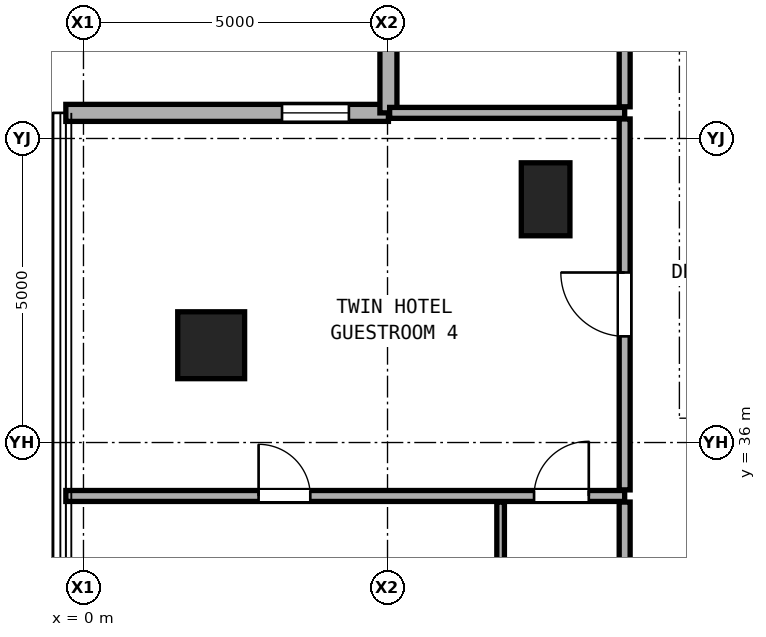
"""IFC4 building model, lengths in metres.
Left out: names, types, materials, properties, quantities, classifications, styles, units other than length and angle.
Written with IfcOpenShell. Run it as: python <this file> out.ifc"""

import sys

from ifc_helpers import new_model, si_unit, direction, frame, frame_2d, origin, origin_2d, place, context, subcontext, project, spatial, rectangle, hollow_rectangle, extrude, element, fill, save


model = new_model("IFC4")
c1 = context("Model", 3, precision=1e-05, world=origin(), true_north=direction((0.0, 1.0)))
c2 = subcontext(c1, "Body", "Model", "MODEL_VIEW")
j1 = project(units=[si_unit("LENGTHUNIT", "METRE"), si_unit("PLANEANGLEUNIT", "RADIAN")], contexts=[c1])
p1 = place(None, origin())
s1 = spatial("IfcSite", under=j1, at=p1, CompositionType="ELEMENT")
p2 = place(p1, origin())
s2 = spatial("IfcBuilding", under=s1, at=p2, CompositionType="ELEMENT")
p3 = place(p2, frame((0.0, 0.0, 95.0)))
s3 = spatial("IfcBuildingStorey", under=s2, at=p3, CompositionType="ELEMENT", Elevation=95.0)
p4 = place(p3, frame((2.1, 37.6, 0.0), z_axis=(0.0, 0.0, 1.0), x_axis=(1.0, 0.0, 0.0)))
e1 = element("IfcColumn", 1, at=p4, inside=s3, PredefinedType="COLUMN", context=c2, shape_type="SweptSolid", body=[
    extrude(hollow_rectangle(XDim=1.1, YDim=1.1, WallThickness=0.06, at=origin_2d()), origin(), (0.0, 0.0, 1.0), 3.3),
])
p5 = place(p3, frame((7.6, 40.0, 0.0), z_axis=(0.0, 0.0, 1.0), x_axis=(1.0, 0.0, 0.0)))
e2 = element("IfcColumn", 2, at=p5, inside=s3, PredefinedType="PILASTER", context=c2, shape_type="SweptSolid", body=[
    extrude(rectangle(XDim=0.8, YDim=1.2, at=origin_2d()), origin(), (0.0, 0.0, 1.0), 3.3),
])
p6 = place(p3, frame((5.015, 41.421, 0.0), z_axis=(0.0, 0.0, 1.0), x_axis=(-1.0, 0.0, 0.0)))
e3 = element("IfcWall", 3, at=p6, inside=s3, PredefinedType="SOLIDWALL", context=c2, shape_type="SweptSolid", body=[
    extrude(rectangle(XDim=5.305, YDim=0.28, at=frame_2d((2.652, 0.0))), origin(), (0.0, 0.0, 1.0), 3.06),
])
p7 = place(p6, frame((0.65, 0.0, 0.85)))
e4 = element("IfcOpeningElement", 4, at=p7, cuts=e3, PredefinedType="OPENING", context=c2, shape_type="SweptSolid", body=[
    extrude(rectangle(XDim=1.1, YDim=2.0, at=frame_2d((0.55, 1.0))), frame((0.0, 0.15, 0.0), z_axis=(0.0, -1.0, 0.0), x_axis=(1.0, 0.0, 0.0)), (0.0, 0.0, 1.0), 0.3),
])
p8 = place(p3, frame((5.015, 46.726, 0.0), z_axis=(0.0, 0.0, 1.0), x_axis=(0.0, -1.0, 0.0)))
e5 = element("IfcWall", 5, at=p8, inside=s3, PredefinedType="SOLIDWALL", context=c2, shape_type="SweptSolid", body=[
    extrude(rectangle(XDim=5.305, YDim=0.28, at=frame_2d((2.653, 0.0))), origin(), (0.0, 0.0, 1.0), 3.06),
])
p9 = place(p3, frame((-0.29, 35.121, 0.0), z_axis=(0.0, 0.0, 1.0), x_axis=(1.0, 0.0, 0.0)))
e6 = element("IfcWall", 6, at=p9, inside=s3, PredefinedType="PARTITIONING", context=c2, shape_type="SweptSolid", body=[
    extrude(rectangle(XDim=9.19, YDim=0.18, at=frame_2d((4.595, 0.0))), origin(), (0.0, 0.0, 1.0), 2.145),
])
p10 = place(p9, frame((3.17, 0.0, 0.0)))
e7 = element("IfcOpeningElement", 7, at=p10, cuts=e6, PredefinedType="OPENING", context=c2, shape_type="SweptSolid", body=[
    extrude(rectangle(XDim=0.85, YDim=2.01, at=frame_2d((0.425, 1.005))), frame((0.0, 0.1, 0.0), z_axis=(0.0, -1.0, 0.0), x_axis=(1.0, 0.0, 0.0)), (0.0, 0.0, 1.0), 0.2),
])
p11 = place(p9, frame((7.7, 0.0, 0.0)))
e8 = element("IfcOpeningElement", 8, at=p11, cuts=e6, PredefinedType="OPENING", context=c2, shape_type="SweptSolid", body=[
    extrude(rectangle(XDim=0.9, YDim=2.1, at=frame_2d((0.45, 1.05))), frame((0.0, 0.1, 0.0), z_axis=(0.0, -1.0, 0.0), x_axis=(1.0, 0.0, 0.0)), (0.0, 0.0, 1.0), 0.2),
])
p12 = place(p3, frame((5.035, 41.421, 0.0), z_axis=(0.0, 0.0, 1.0), x_axis=(1.0, 0.0, 0.0)))
e9 = element("IfcWall", 9, at=p12, inside=s3, PredefinedType="PARTITIONING", context=c2, shape_type="SweptSolid", body=[
    extrude(rectangle(XDim=3.865, YDim=0.18, at=frame_2d((1.933, 0.0))), origin(), (0.0, 0.0, 1.0), 3.08),
])
p13 = place(p3, frame((6.86, 32.921, 0.0), z_axis=(0.0, 0.0, 1.0), x_axis=(0.0, 1.0, 0.0)))
e10 = element("IfcWall", 10, at=p13, inside=s3, PredefinedType="PARTITIONING", context=c2, shape_type="SweptSolid", body=[
    extrude(rectangle(XDim=2.1, YDim=0.125, at=frame_2d((1.05, 0.0))), origin(), (0.0, 0.0, 1.0), 3.08),
])
p14 = place(p3, frame((8.9, 32.921, 0.0), z_axis=(0.0, 0.0, 1.0), x_axis=(0.0, 1.0, 0.0)))
e11 = element("IfcWall", 11, at=p14, inside=s3, PredefinedType="PARTITIONING", context=c2, shape_type="SweptSolid", body=[
    extrude(rectangle(XDim=2.1, YDim=0.18, at=frame_2d((1.05, 0.0))), origin(), (0.0, 0.0, 1.0), 3.08),
])
p15 = place(p3, frame((8.9, 35.221, 0.0), z_axis=(0.0, 0.0, 1.0), x_axis=(0.0, 1.0, 0.0)))
e12 = element("IfcWall", 12, at=p15, inside=s3, PredefinedType="PARTITIONING", context=c2, shape_type="SweptSolid", body=[
    extrude(rectangle(XDim=6.1, YDim=0.18, at=frame_2d((3.05, 0.0))), origin(), (0.0, 0.0, 1.0), 2.456),
])
p16 = place(p15, frame((2.525, 0.0, 0.0)))
e13 = element("IfcOpeningElement", 13, at=p16, cuts=e12, PredefinedType="OPENING", context=c2, shape_type="SweptSolid", body=[
    extrude(rectangle(XDim=1.05, YDim=2.2, at=frame_2d((0.525, 1.1))), frame((0.0, 0.1, 0.0), z_axis=(0.0, -1.0, 0.0), x_axis=(1.0, 0.0, 0.0)), (0.0, 0.0, 1.0), 0.2),
])
p17 = place(p3, frame((8.9, 41.521, 0.0), z_axis=(0.0, 0.0, 1.0), x_axis=(0.0, 1.0, 0.0)))
e14 = element("IfcWall", 14, at=p17, inside=s3, PredefinedType="PARTITIONING", context=c2, shape_type="SweptSolid", body=[
    extrude(rectangle(XDim=5.205, YDim=0.18, at=frame_2d((2.603, 0.0))), origin(), (0.0, 0.0, 1.0), 3.08),
])
p18 = place(p17, frame((2.127, 0.0, 0.0)))
e15 = element("IfcOpeningElement", 15, at=p18, cuts=e14, PredefinedType="OPENING", context=c2, shape_type="SweptSolid", body=[
    extrude(rectangle(XDim=0.95, YDim=2.15, at=frame_2d((0.475, 1.075))), frame((0.0, 0.1, 0.0), z_axis=(0.0, -1.0, 0.0), x_axis=(1.0, 0.0, 0.0)), (0.0, 0.0, 1.0), 0.2),
])
p19 = place(p7, origin())
e16 = element("IfcWindow", 16, at=p19, inside=s3, PartitioningType="SINGLE_PANEL", PredefinedType="WINDOW", context=c2, shape_type="SweptSolid", body=[
    extrude(rectangle(XDim=1.1, YDim=2.0, at=frame_2d((0.55, 1.0))), frame((0.0, 0.03, 0.0), z_axis=(0.0, -1.0, 0.0), x_axis=(1.0, 0.0, 0.0)), (0.0, 0.0, 1.0), 0.06),
])
fill(e4, e16)
p20 = place(p16, origin())
e17 = element("IfcDoor", 17, at=p20, inside=s3, OperationType="SINGLE_SWING_RIGHT", PredefinedType="DOOR", context=c2, shape_type="SweptSolid", body=[
    extrude(rectangle(XDim=1.05, YDim=2.2, at=frame_2d((0.525, 1.1))), frame((0.0, 0.025, 0.0), z_axis=(0.0, -1.0, 0.0), x_axis=(1.0, 0.0, 0.0)), (0.0, 0.0, 1.0), 0.05),
])
fill(e13, e17)
p21 = place(p10, origin())
e18 = element("IfcDoor", 18, at=p21, inside=s3, OperationType="SINGLE_SWING_LEFT", PredefinedType="DOOR", context=c2, shape_type="SweptSolid", body=[
    extrude(rectangle(XDim=0.85, YDim=2.01, at=frame_2d((0.425, 1.005))), frame((0.0, 0.025, 0.0), z_axis=(0.0, -1.0, 0.0), x_axis=(1.0, 0.0, 0.0)), (0.0, 0.0, 1.0), 0.05),
])
fill(e7, e18)
p22 = place(p11, origin())
e19 = element("IfcDoor", 19, at=p22, inside=s3, OperationType="SINGLE_SWING_RIGHT", PredefinedType="DOOR", context=c2, shape_type="SweptSolid", body=[
    extrude(rectangle(XDim=0.9, YDim=2.1, at=frame_2d((0.45, 1.05))), frame((0.0, 0.025, 0.0), z_axis=(0.0, -1.0, 0.0), x_axis=(1.0, 0.0, 0.0)), (0.0, 0.0, 1.0), 0.05),
])
fill(e8, e19)
save(model, sys.argv[1])
